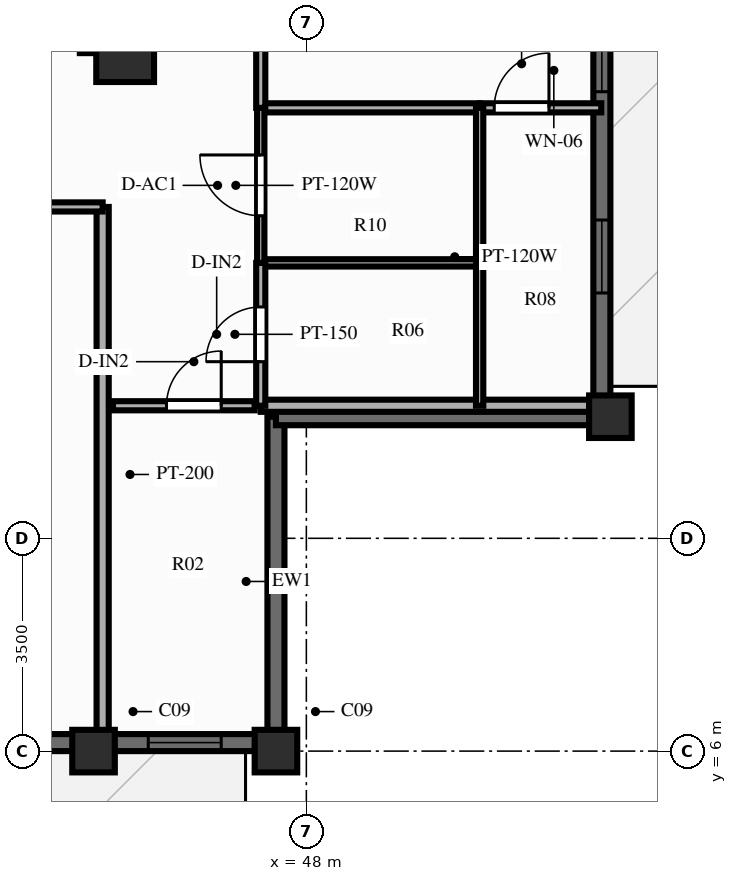
"""IFC4 building model, lengths in metres.
Left out: names, types, materials, properties, quantities, classifications, styles, units other than length and angle.
Written with IfcOpenShell. Run it as: python <this file> out.ifc"""

import sys

from ifc_helpers import new_model, si_unit, direction, frame, frame_2d, origin, origin_2d, place, context, subcontext, project, spatial, rectangle, extrude, source, transform, mapped, element, fill, save


model = new_model("IFC4")
c1 = context("Model", 3, precision=1e-05, world=origin(), true_north=direction((0.0, 1.0)))
c2 = subcontext(c1, "Body", "Model", "MODEL_VIEW")
j1 = project(units=[si_unit("LENGTHUNIT", "METRE"), si_unit("PLANEANGLEUNIT", "RADIAN")], contexts=[c1])
p1 = place(None, origin())
s1 = spatial("IfcSite", under=j1, at=p1, CompositionType="ELEMENT")
p2 = place(p1, origin())
s2 = spatial("IfcBuilding", under=s1, at=p2, CompositionType="ELEMENT")
p3 = place(p2, frame((0.0, 0.0, 249.0)))
s3 = spatial("IfcBuildingStorey", under=s2, at=p3, CompositionType="ELEMENT", Elevation=249.0)
p4 = place(p3, frame((44.5, 17.48, 0.0), z_axis=(0.0, 0.0, 1.0), x_axis=(0.0, 1.0, 0.0)))
e1 = element("IfcWall", 1, at=p4, inside=s3, PredefinedType="SHEAR", context=c2, shape_type="SweptSolid", body=[
    extrude(rectangle(XDim=19.04, YDim=0.45, at=frame_2d((9.52, 0.0))), origin(), (0.0, 0.0, 1.0), 3.2),
])
p5 = place(p4, frame((12.67, 0.0, 0.0), z_axis=(0.0, 0.0, 1.0), x_axis=(-1.0, 0.0, 0.0)))
e2 = element("IfcOpeningElement", 2, at=p5, cuts=e1, PredefinedType="OPENING", context=c2, shape_type="SweptSolid", body=[
    extrude(rectangle(XDim=1.1, YDim=2.15, at=frame_2d((0.55, 1.075))), frame((0.0, 0.237, 0.0), z_axis=(0.0, -1.0, 0.0), x_axis=(1.0, 0.0, 0.0)), (0.0, 0.0, 1.0), 0.474),
])
m1 = source(origin(), c2, "Body", "SweptSolid", [
    extrude(rectangle(XDim=0.95, YDim=0.95, at=origin_2d()), origin(), (0.0, 0.0, 1.0), 3.2),
])
p6 = place(p3, frame((45.02, 17.48, 0.0), z_axis=(0.0, 0.0, 1.0), x_axis=(1.0, 0.0, 0.0)))
e3 = element("IfcColumn", 3, at=p6, inside=s3, PredefinedType="COLUMN", context=c2, shape_type="MappedRepresentation", body=[
    mapped(m1, transform((0.0, 0.0, 0.0), scale=1.0)),
])
m2 = source(origin(), c2, "Body", "SweptSolid", [
    extrude(rectangle(XDim=0.7, YDim=0.7, at=origin_2d()), origin(), (0.0, 0.0, 1.0), 3.2),
])
for number, where, z_axis, x_axis in (
    (4, (44.5, 6.0, 0.0), (0.0, 0.0, 1.0), (1.0, 0.0, 0.0)),
    (5, (47.5, 6.0, 0.0), (0.0, 0.0, 1.0), (1.0, 0.0, 0.0)),
    (6, (53.0, 11.5, 0.0), (0.0, 0.0, 1.0), (1.0, 0.0, 0.0)),
):
    element("IfcColumn", number, at=place(p3, frame(where, z_axis=z_axis, x_axis=x_axis)), inside=s3, PredefinedType="COLUMN", context=c2, shape_type="MappedRepresentation", body=[
        mapped(m2, transform((0.0, 0.0, 0.0), scale=1.0)),
    ])
p7 = place(p3, frame((28.5, 6.14, 0.0), z_axis=(0.0, 0.0, 1.0), x_axis=(1.0, 0.0, 0.0)))
e7 = element("IfcWall", 7, at=p7, inside=s3, PredefinedType="SOLIDWALL", context=c2, shape_type="SweptSolid", body=[
    extrude(rectangle(XDim=19.0, YDim=0.28, at=frame_2d((9.5, 0.0))), origin(), (0.0, 0.0, 1.0), 2.48),
])
p8 = place(p7, frame((0.9, 0.0, 0.25)))
e8 = element("IfcOpeningElement", 8, at=p8, cuts=e7, PredefinedType="OPENING", context=c2, shape_type="SweptSolid", body=[
    extrude(rectangle(XDim=1.2, YDim=1.5, at=frame_2d((0.6, 0.75))), frame((0.0, 0.152, 0.0), z_axis=(0.0, -1.0, 0.0), x_axis=(1.0, 0.0, 0.0)), (0.0, 0.0, 1.0), 0.304),
])
p9 = place(p7, frame((7.028, 0.0, 0.0), z_axis=(0.0, 0.0, 1.0), x_axis=(-1.0, 0.0, 0.0)))
e9 = element("IfcOpeningElement", 9, at=p9, cuts=e7, PredefinedType="OPENING", context=c2, shape_type="SweptSolid", body=[
    extrude(rectangle(XDim=1.1, YDim=2.15, at=frame_2d((0.55, 1.075))), frame((0.0, 0.152, 0.0), z_axis=(0.0, -1.0, 0.0), x_axis=(1.0, 0.0, 0.0)), (0.0, 0.0, 1.0), 0.304),
])
p10 = place(p7, frame((12.188, 0.0, 0.25)))
e10 = element("IfcOpeningElement", 10, at=p10, cuts=e7, PredefinedType="OPENING", context=c2, shape_type="SweptSolid", body=[
    extrude(rectangle(XDim=1.2, YDim=1.5, at=frame_2d((0.6, 0.75))), frame((0.0, 0.152, 0.0), z_axis=(0.0, -1.0, 0.0), x_axis=(1.0, 0.0, 0.0)), (0.0, 0.0, 1.0), 0.304),
])
p11 = place(p7, frame((16.9, 0.0, 0.25)))
e11 = element("IfcOpeningElement", 11, at=p11, cuts=e7, PredefinedType="OPENING", context=c2, shape_type="SweptSolid", body=[
    extrude(rectangle(XDim=1.2, YDim=1.5, at=frame_2d((0.6, 0.75))), frame((0.0, 0.152, 0.0), z_axis=(0.0, -1.0, 0.0), x_axis=(1.0, 0.0, 0.0)), (0.0, 0.0, 1.0), 0.304),
])
p12 = place(p3, frame((52.86, 11.5, 0.0), z_axis=(0.0, 0.0, 1.0), x_axis=(0.0, 1.0, 0.0)))
e12 = element("IfcWall", 12, at=p12, inside=s3, PredefinedType="SOLIDWALL", context=c2, shape_type="SweptSolid", body=[
    extrude(rectangle(XDim=31.0, YDim=0.28, at=frame_2d((15.5, 0.0))), origin(), (0.0, 0.0, 1.0), 2.48),
])
p13 = place(p12, frame((2.035, 0.0, 0.25)))
e13 = element("IfcOpeningElement", 13, at=p13, cuts=e12, PredefinedType="OPENING", context=c2, shape_type="SweptSolid", body=[
    extrude(rectangle(XDim=1.2, YDim=1.5, at=frame_2d((0.6, 0.75))), frame((0.0, 0.152, 0.0), z_axis=(0.0, -1.0, 0.0), x_axis=(1.0, 0.0, 0.0)), (0.0, 0.0, 1.0), 0.304),
])
p14 = place(p12, frame((5.345, 0.0, 0.25)))
e14 = element("IfcOpeningElement", 14, at=p14, cuts=e12, PredefinedType="OPENING", context=c2, shape_type="SweptSolid", body=[
    extrude(rectangle(XDim=0.7, YDim=1.5, at=frame_2d((0.35, 0.75))), frame((0.0, 0.152, 0.0), z_axis=(0.0, -1.0, 0.0), x_axis=(1.0, 0.0, 0.0)), (0.0, 0.0, 1.0), 0.304),
])
p15 = place(p12, frame((11.895, 0.0, 0.0), z_axis=(0.0, 0.0, 1.0), x_axis=(-1.0, 0.0, 0.0)))
e15 = element("IfcOpeningElement", 15, at=p15, cuts=e12, PredefinedType="OPENING", context=c2, shape_type="SweptSolid", body=[
    extrude(rectangle(XDim=1.6, YDim=2.15, at=frame_2d((0.8, 1.075))), frame((0.0, 0.152, 0.0), z_axis=(0.0, -1.0, 0.0), x_axis=(1.0, 0.0, 0.0)), (0.0, 0.0, 1.0), 0.304),
])
p16 = place(p12, frame((16.892, 0.0, 0.25)))
e16 = element("IfcOpeningElement", 16, at=p16, cuts=e12, PredefinedType="OPENING", context=c2, shape_type="SweptSolid", body=[
    extrude(rectangle(XDim=1.2, YDim=1.5, at=frame_2d((0.6, 0.75))), frame((0.0, 0.152, 0.0), z_axis=(0.0, -1.0, 0.0), x_axis=(1.0, 0.0, 0.0)), (0.0, 0.0, 1.0), 0.304),
])
p17 = place(p12, frame((21.297, 0.0, 0.25)))
e17 = element("IfcOpeningElement", 17, at=p17, cuts=e12, PredefinedType="OPENING", context=c2, shape_type="SweptSolid", body=[
    extrude(rectangle(XDim=1.2, YDim=1.5, at=frame_2d((0.6, 0.75))), frame((0.0, 0.152, 0.0), z_axis=(0.0, -1.0, 0.0), x_axis=(1.0, 0.0, 0.0)), (0.0, 0.0, 1.0), 0.304),
])
p18 = place(p12, frame((25.155, 0.0, 0.25)))
e18 = element("IfcOpeningElement", 18, at=p18, cuts=e12, PredefinedType="OPENING", context=c2, shape_type="SweptSolid", body=[
    extrude(rectangle(XDim=1.2, YDim=1.5, at=frame_2d((0.6, 0.75))), frame((0.0, 0.152, 0.0), z_axis=(0.0, -1.0, 0.0), x_axis=(1.0, 0.0, 0.0)), (0.0, 0.0, 1.0), 0.304),
])
p19 = place(p12, frame((28.215, 0.0, 0.25)))
e19 = element("IfcOpeningElement", 19, at=p19, cuts=e12, PredefinedType="OPENING", context=c2, shape_type="SweptSolid", body=[
    extrude(rectangle(XDim=1.2, YDim=1.5, at=frame_2d((0.6, 0.75))), frame((0.0, 0.152, 0.0), z_axis=(0.0, -1.0, 0.0), x_axis=(1.0, 0.0, 0.0)), (0.0, 0.0, 1.0), 0.304),
])
for number, where, z_axis, x_axis in (
    (20, (47.5, 6.08, 0.0), (0.0, 0.0, 1.0), (0.0, 1.0, 0.0)),
    (21, (47.5, 11.5, 0.0), (0.0, 0.0, 1.0), (1.0, 0.0, 0.0)),
):
    element("IfcWall", number, at=place(p3, frame(where, z_axis=z_axis, x_axis=x_axis)), inside=s3, PredefinedType="SOLIDWALL", context=c2, shape_type="SweptSolid", body=[
        extrude(rectangle(XDim=5.42, YDim=0.28, at=frame_2d((2.71, 0.0))), origin(), (0.0, 0.0, 1.0), 2.48),
    ])
p20 = place(p3, frame((44.82, 11.68, 0.0), z_axis=(0.0, 0.0, 1.0), x_axis=(1.0, 0.0, 0.0)))
e22 = element("IfcWall", 22, at=p20, inside=s3, PredefinedType="PARTITIONING", context=c2, shape_type="SweptSolid", body=[
    extrude(rectangle(XDim=2.33, YDim=0.15, at=frame_2d((1.165, 0.0))), origin(), (0.0, 0.0, 1.0), 2.88),
])
p21 = place(p20, frame((0.88, 0.0, 0.0)))
e23 = element("IfcOpeningElement", 23, at=p21, cuts=e22, PredefinedType="OPENING", context=c2, shape_type="SweptSolid", body=[
    extrude(rectangle(XDim=0.9, YDim=2.1, at=frame_2d((0.45, 1.05))), frame((0.0, 0.087, 0.0), z_axis=(0.0, -1.0, 0.0), x_axis=(1.0, 0.0, 0.0)), (0.0, 0.0, 1.0), 0.174),
])
p22 = place(p3, frame((44.65, 14.95, 0.0), z_axis=(0.0, 0.0, 1.0), x_axis=(0.0, -1.0, 0.0)))
e24 = element("IfcWall", 24, at=p22, inside=s3, PredefinedType="PARTITIONING", context=c2, shape_type="SweptSolid", body=[
    extrude(rectangle(XDim=8.8, YDim=0.2, at=frame_2d((4.4, 0.0))), origin(), (0.0, 0.0, 1.0), 2.59),
])
p23 = place(p3, frame((38.266, 14.95, 0.0), z_axis=(0.0, 0.0, 1.0), x_axis=(1.0, 0.0, 0.0)))
e25 = element("IfcWall", 25, at=p23, inside=s3, PredefinedType="PARTITIONING", context=c2, shape_type="SweptSolid", body=[
    extrude(rectangle(XDim=6.384, YDim=0.15, at=frame_2d((3.192, 0.0))), origin(), (0.0, 0.0, 1.0), 2.88),
])
p24 = place(p23, frame((2.642, 0.0, 0.0)))
e26 = element("IfcOpeningElement", 26, at=p24, cuts=e25, PredefinedType="OPENING", context=c2, shape_type="SweptSolid", body=[
    extrude(rectangle(XDim=1.1, YDim=2.15, at=frame_2d((0.55, 1.075))), frame((0.0, 0.087, 0.0), z_axis=(0.0, -1.0, 0.0), x_axis=(1.0, 0.0, 0.0)), (0.0, 0.0, 1.0), 0.174),
])
p25 = place(p3, frame((47.25, 11.68, 0.0), z_axis=(0.0, 0.0, 1.0), x_axis=(1.0, 0.0, 0.0)))
e27 = element("IfcWall", 27, at=p25, inside=s3, PredefinedType="PARTITIONING", context=c2, shape_type="SweptSolid", body=[
    extrude(rectangle(XDim=5.6, YDim=0.2, at=frame_2d((2.8, 0.0))), origin(), (0.0, 0.0, 1.0), 2.88),
])
p26 = place(p3, frame((47.25, 14.03, 0.0), z_axis=(0.0, 0.0, 1.0), x_axis=(1.0, 0.0, 0.0)))
e28 = element("IfcWall", 28, at=p26, inside=s3, PredefinedType="PARTITIONING", context=c2, shape_type="SweptSolid", body=[
    extrude(rectangle(XDim=3.6, YDim=0.12, at=frame_2d((1.8, 0.0))), origin(), (0.0, 0.0, 1.0), 2.88),
])
p27 = place(p3, frame((47.25, 16.58, 0.0), z_axis=(0.0, 0.0, 1.0), x_axis=(1.0, 0.0, 0.0)))
e29 = element("IfcWall", 29, at=p27, inside=s3, PredefinedType="PARTITIONING", context=c2, shape_type="SweptSolid", body=[
    extrude(rectangle(XDim=3.6, YDim=0.15, at=frame_2d((1.8, 0.0))), origin(), (0.0, 0.0, 1.0), 2.88),
])
p28 = place(p3, frame((50.85, 16.58, 0.0), z_axis=(0.0, 0.0, 1.0), x_axis=(1.0, 0.0, 0.0)))
e30 = element("IfcWall", 30, at=p28, inside=s3, PredefinedType="PARTITIONING", context=c2, shape_type="SweptSolid", body=[
    extrude(rectangle(XDim=2.0, YDim=0.15, at=frame_2d((1.0, 0.0))), origin(), (0.0, 0.0, 1.0), 2.88),
])
p29 = place(p28, frame((0.24, 0.0, 0.0)))
e31 = element("IfcOpeningElement", 31, at=p29, cuts=e30, PredefinedType="OPENING", context=c2, shape_type="SweptSolid", body=[
    extrude(rectangle(XDim=0.9, YDim=2.1, at=frame_2d((0.45, 1.05))), frame((0.0, 0.087, 0.0), z_axis=(0.0, -1.0, 0.0), x_axis=(1.0, 0.0, 0.0)), (0.0, 0.0, 1.0), 0.174),
])
p30 = place(p3, frame((50.85, 11.68, 0.0), z_axis=(0.0, 0.0, 1.0), x_axis=(0.0, 1.0, 0.0)))
e32 = element("IfcWall", 32, at=p30, inside=s3, PredefinedType="PARTITIONING", context=c2, shape_type="SweptSolid", body=[
    extrude(rectangle(XDim=4.9, YDim=0.12, at=frame_2d((2.45, 0.0))), origin(), (0.0, 0.0, 1.0), 2.88),
])
p31 = place(p3, frame((47.25, 11.68, 0.0), z_axis=(0.0, 0.0, 1.0), x_axis=(0.0, 1.0, 0.0)))
e33 = element("IfcWall", 33, at=p31, inside=s3, PredefinedType="PARTITIONING", context=c2, shape_type="SweptSolid", body=[
    extrude(rectangle(XDim=2.35, YDim=0.15, at=frame_2d((1.175, 0.0))), origin(), (0.0, 0.0, 1.0), 2.88),
])
p32 = place(p31, frame((0.725, 0.0, 0.0)))
e34 = element("IfcOpeningElement", 34, at=p32, cuts=e33, PredefinedType="OPENING", context=c2, shape_type="SweptSolid", body=[
    extrude(rectangle(XDim=0.9, YDim=2.1, at=frame_2d((0.45, 1.05))), frame((0.0, 0.087, 0.0), z_axis=(0.0, -1.0, 0.0), x_axis=(1.0, 0.0, 0.0)), (0.0, 0.0, 1.0), 0.174),
])
p33 = place(p3, frame((47.25, 14.03, 0.0), z_axis=(0.0, 0.0, 1.0), x_axis=(0.0, 1.0, 0.0)))
e35 = element("IfcWall", 35, at=p33, inside=s3, PredefinedType="PARTITIONING", context=c2, shape_type="SweptSolid", body=[
    extrude(rectangle(XDim=2.55, YDim=0.12, at=frame_2d((1.275, 0.0))), origin(), (0.0, 0.0, 1.0), 2.88),
])
p34 = place(p33, frame((0.775, 0.0, 0.0)))
e36 = element("IfcOpeningElement", 36, at=p34, cuts=e35, PredefinedType="OPENING", context=c2, shape_type="SweptSolid", body=[
    extrude(rectangle(XDim=1.0, YDim=2.1, at=frame_2d((0.5, 1.05))), frame((0.0, 0.072, 0.0), z_axis=(0.0, -1.0, 0.0), x_axis=(1.0, 0.0, 0.0)), (0.0, 0.0, 1.0), 0.144),
])
p35 = place(p3, frame((47.25, 16.58, 0.0), z_axis=(0.0, 0.0, 1.0), x_axis=(0.0, 1.0, 0.0)))
e37 = element("IfcWall", 37, at=p35, inside=s3, PredefinedType="PARTITIONING", context=c2, shape_type="SweptSolid", body=[
    extrude(rectangle(XDim=10.42, YDim=0.15, at=frame_2d((5.21, 0.0))), origin(), (0.0, 0.0, 1.0), 2.88),
])
p36 = place(p35, frame((4.293, 0.0, 0.0)))
e38 = element("IfcOpeningElement", 38, at=p36, cuts=e37, PredefinedType="OPENING", context=c2, shape_type="SweptSolid", body=[
    extrude(rectangle(XDim=1.1, YDim=2.15, at=frame_2d((0.55, 1.075))), frame((0.0, 0.087, 0.0), z_axis=(0.0, -1.0, 0.0), x_axis=(1.0, 0.0, 0.0)), (0.0, 0.0, 1.0), 0.174),
])
m3 = source(origin(), c2, "Body", "SweptSolid", [
    extrude(rectangle(XDim=1.2, YDim=1.5, at=frame_2d((0.6, 0.75))), frame((0.0, 0.03, 0.0), z_axis=(0.0, -1.0, 0.0), x_axis=(1.0, 0.0, 0.0)), (0.0, 0.0, 1.0), 0.06),
])
p37 = place(p11, origin())
e39 = element("IfcWindow", 39, at=p37, inside=s3, PartitioningType="SINGLE_PANEL", PredefinedType="WINDOW", context=c2, shape_type="MappedRepresentation", body=[
    mapped(m3, transform((0.0, 0.0, 0.0), scale=1.0)),
])
fill(e11, e39)
p38 = place(p13, origin())
e40 = element("IfcWindow", 40, at=p38, inside=s3, PartitioningType="SINGLE_PANEL", PredefinedType="WINDOW", context=c2, shape_type="MappedRepresentation", body=[
    mapped(m3, transform((0.0, 0.0, 0.0), scale=1.0)),
])
fill(e13, e40)
m4 = source(origin(), c2, "Body", "SweptSolid", [
    extrude(rectangle(XDim=0.7, YDim=1.5, at=frame_2d((0.35, 0.75))), frame((0.0, 0.03, 0.0), z_axis=(0.0, -1.0, 0.0), x_axis=(1.0, 0.0, 0.0)), (0.0, 0.0, 1.0), 0.06),
])
p39 = place(p14, origin())
e41 = element("IfcWindow", 41, at=p39, inside=s3, PartitioningType="SINGLE_PANEL", PredefinedType="WINDOW", context=c2, shape_type="MappedRepresentation", body=[
    mapped(m4, transform((0.0, 0.0, 0.0), scale=1.0)),
])
fill(e14, e41)
m5 = source(origin(), c2, "Body", "SweptSolid", [
    extrude(rectangle(XDim=0.9, YDim=2.1, at=frame_2d((0.45, 1.05))), frame((0.0, 0.025, 0.0), z_axis=(0.0, -1.0, 0.0), x_axis=(1.0, 0.0, 0.0)), (0.0, 0.0, 1.0), 0.05),
])
p40 = place(p21, origin())
e42 = element("IfcDoor", 42, at=p40, inside=s3, OperationType="SINGLE_SWING_RIGHT", PredefinedType="DOOR", context=c2, shape_type="MappedRepresentation", body=[
    mapped(m5, transform((0.0, 0.0, 0.0), scale=1.0)),
])
fill(e23, e42)
p41 = place(p29, origin())
e43 = element("IfcDoor", 43, at=p41, inside=s3, OperationType="SINGLE_SWING_RIGHT", PredefinedType="DOOR", context=c2, shape_type="MappedRepresentation", body=[
    mapped(m5, transform((0.0, 0.0, 0.0), scale=1.0)),
])
fill(e31, e43)
p42 = place(p32, origin())
e44 = element("IfcDoor", 44, at=p42, inside=s3, OperationType="SINGLE_SWING_LEFT", PredefinedType="DOOR", context=c2, shape_type="MappedRepresentation", body=[
    mapped(m5, transform((0.0, 0.0, 0.0), scale=1.0)),
])
fill(e34, e44)
m6 = source(origin(), c2, "Body", "SweptSolid", [
    extrude(rectangle(XDim=1.0, YDim=2.1, at=frame_2d((0.5, 1.05))), frame((0.0, 0.025, 0.0), z_axis=(0.0, -1.0, 0.0), x_axis=(1.0, 0.0, 0.0)), (0.0, 0.0, 1.0), 0.05),
])
p43 = place(p34, origin())
e45 = element("IfcDoor", 45, at=p43, inside=s3, OperationType="SINGLE_SWING_RIGHT", PredefinedType="DOOR", context=c2, shape_type="MappedRepresentation", body=[
    mapped(m6, transform((0.0, 0.0, 0.0), scale=1.0)),
])
fill(e36, e45)
save(model, sys.argv[1])
